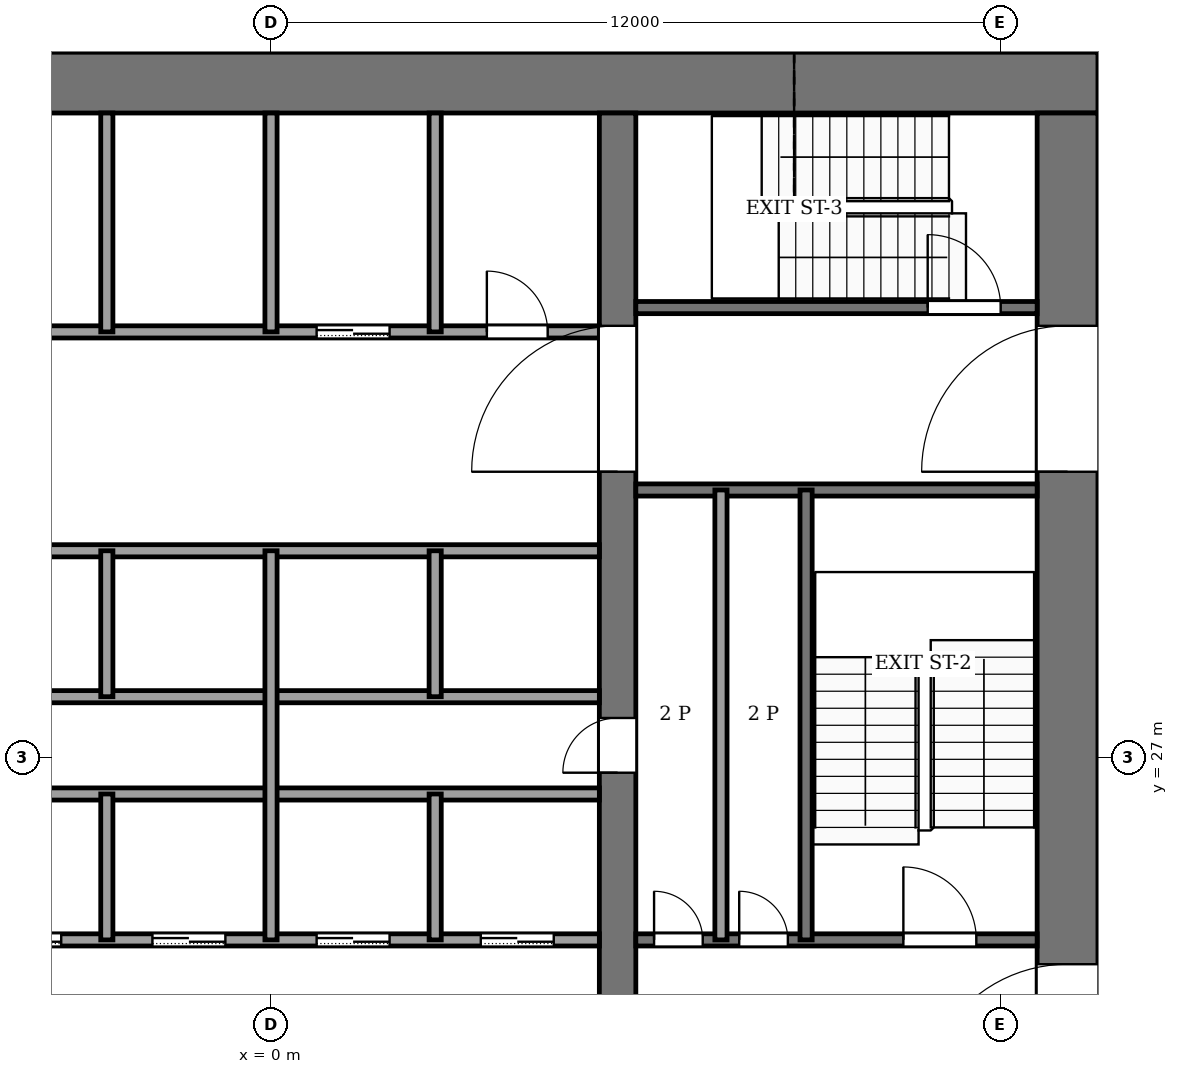
"""IFC4 building model, lengths in metres.
Left out: names, types, materials, properties, quantities, classifications, styles, units other than length and angle.
Written with IfcOpenShell. Run it as: python <this file> out.ifc"""

import sys

from ifc_helpers import new_model, si_unit, direction, frame, frame_2d, origin, place, context, subcontext, project, spatial, rectangle, extrude, element, fill, save


model = new_model("IFC4")
c1 = context("Model", 3, precision=1e-05, world=origin(), true_north=direction((0.0, 1.0)))
c2 = subcontext(c1, "Body", "Model", "MODEL_VIEW")
j1 = project(units=[si_unit("LENGTHUNIT", "METRE"), si_unit("PLANEANGLEUNIT", "RADIAN")], contexts=[c1])
p1 = place(None, origin())
s1 = spatial("IfcSite", under=j1, at=p1, CompositionType="ELEMENT")
p2 = place(p1, origin())
s2 = spatial("IfcBuilding", under=s1, at=p2, CompositionType="ELEMENT")
p3 = place(p2, frame((0.0, 0.0, 146.0)))
s3 = spatial("IfcBuildingStorey", under=s2, at=p3, CompositionType="ELEMENT", Elevation=146.0)
p4 = place(p3, frame((-13.6, 38.1, -0.13), z_axis=(0.0, 0.0, 1.0), x_axis=(1.0, 0.0, 0.0)))
e1 = element("IfcWall", 1, at=p4, inside=s3, PredefinedType="SHEAR", context=c2, shape_type="SweptSolid", body=[
    extrude(rectangle(XDim=27.2, YDim=1.0, at=frame_2d((13.6, 0.0))), origin(), (0.0, 0.0, 1.0), 4.0),
])
p5 = place(p3, frame((13.1, 18.4, -0.13), z_axis=(0.0, 0.0, 1.0), x_axis=(0.0, 1.0, 0.0)))
e2 = element("IfcWall", 2, at=p5, inside=s3, PredefinedType="SHEAR", context=c2, shape_type="SweptSolid", body=[
    extrude(rectangle(XDim=19.2, YDim=1.0, at=frame_2d((9.6, 0.0))), origin(), (0.0, 0.0, 1.0), 4.0),
])
p6 = place(p5, frame((2.8, 0.0, 0.13)))
e3 = element("IfcOpeningElement", 3, at=p6, cuts=e2, PredefinedType="OPENING", context=c2, shape_type="SweptSolid", body=[
    extrude(rectangle(XDim=2.4, YDim=2.4, at=frame_2d((1.2, 1.2))), frame((0.0, 0.51, 0.0), z_axis=(0.0, -1.0, 0.0), x_axis=(1.0, 0.0, 0.0)), (0.0, 0.0, 1.0), 1.02),
])
p7 = place(p5, frame((13.3, 0.0, 0.13)))
e4 = element("IfcOpeningElement", 4, at=p7, cuts=e2, PredefinedType="OPENING", context=c2, shape_type="SweptSolid", body=[
    extrude(rectangle(XDim=2.4, YDim=2.4, at=frame_2d((1.2, 1.2))), frame((0.0, 0.51, 0.0), z_axis=(0.0, -1.0, 0.0), x_axis=(1.0, 0.0, 0.0)), (0.0, 0.0, 1.0), 1.02),
])
p8 = place(p3, frame((5.7, 18.4, -0.13), z_axis=(0.0, 0.0, 1.0), x_axis=(0.0, 1.0, 0.0)))
e5 = element("IfcWall", 5, at=p8, inside=s3, PredefinedType="SHEAR", context=c2, shape_type="SweptSolid", body=[
    extrude(rectangle(XDim=19.2, YDim=0.6, at=frame_2d((9.6, 0.0))), origin(), (0.0, 0.0, 1.0), 4.0),
])
p9 = place(p8, frame((8.35, 0.0, 0.13)))
e6 = element("IfcOpeningElement", 6, at=p9, cuts=e5, PredefinedType="OPENING", context=c2, shape_type="SweptSolid", body=[
    extrude(rectangle(XDim=0.9, YDim=2.1, at=frame_2d((0.45, 1.05))), frame((0.0, 0.31, 0.0), z_axis=(0.0, -1.0, 0.0), x_axis=(1.0, 0.0, 0.0)), (0.0, 0.0, 1.0), 0.62),
])
p10 = place(p8, frame((13.3, 0.0, 0.13)))
e7 = element("IfcOpeningElement", 7, at=p10, cuts=e5, PredefinedType="OPENING", context=c2, shape_type="SweptSolid", body=[
    extrude(rectangle(XDim=2.4, YDim=2.4, at=frame_2d((1.2, 1.2))), frame((0.0, 0.31, 0.0), z_axis=(0.0, -1.0, 0.0), x_axis=(1.0, 0.0, 0.0)), (0.0, 0.0, 1.0), 0.62),
])
p11 = place(p3, frame((-5.4, 24.0, 0.0), z_axis=(0.0, 0.0, 1.0), x_axis=(1.0, 0.0, 0.0)))
e8 = element("IfcWall", 8, at=p11, inside=s3, PredefinedType="PARTITIONING", context=c2, shape_type="SweptSolid", body=[
    extrude(rectangle(XDim=10.8, YDim=0.2, at=frame_2d((5.4, 0.0))), origin(), (0.0, 0.0, 1.0), 3.87),
])
p12 = place(p11, frame((0.75, 0.0, 0.0)))
e9 = element("IfcOpeningElement", 9, at=p12, cuts=e8, PredefinedType="OPENING", context=c2, shape_type="SweptSolid", body=[
    extrude(rectangle(XDim=1.2, YDim=2.2, at=frame_2d((0.6, 1.1))), frame((0.0, 0.11, 0.0), z_axis=(0.0, -1.0, 0.0), x_axis=(1.0, 0.0, 0.0)), (0.0, 0.0, 1.0), 0.22),
])
p13 = place(p11, frame((3.45, 0.0, 0.0)))
e10 = element("IfcOpeningElement", 10, at=p13, cuts=e8, PredefinedType="OPENING", context=c2, shape_type="SweptSolid", body=[
    extrude(rectangle(XDim=1.2, YDim=2.2, at=frame_2d((0.6, 1.1))), frame((0.0, 0.11, 0.0), z_axis=(0.0, -1.0, 0.0), x_axis=(1.0, 0.0, 0.0)), (0.0, 0.0, 1.0), 0.22),
])
p14 = place(p11, frame((6.15, 0.0, 0.0)))
e11 = element("IfcOpeningElement", 11, at=p14, cuts=e8, PredefinedType="OPENING", context=c2, shape_type="SweptSolid", body=[
    extrude(rectangle(XDim=1.2, YDim=2.2, at=frame_2d((0.6, 1.1))), frame((0.0, 0.11, 0.0), z_axis=(0.0, -1.0, 0.0), x_axis=(1.0, 0.0, 0.0)), (0.0, 0.0, 1.0), 0.22),
])
p15 = place(p11, frame((8.85, 0.0, 0.0)))
e12 = element("IfcOpeningElement", 12, at=p15, cuts=e8, PredefinedType="OPENING", context=c2, shape_type="SweptSolid", body=[
    extrude(rectangle(XDim=1.2, YDim=2.2, at=frame_2d((0.6, 1.1))), frame((0.0, 0.11, 0.0), z_axis=(0.0, -1.0, 0.0), x_axis=(1.0, 0.0, 0.0)), (0.0, 0.0, 1.0), 0.22),
])
p16 = place(p3, frame((6.0, 24.0, 0.0), z_axis=(0.0, 0.0, 1.0), x_axis=(1.0, 0.0, 0.0)))
e13 = element("IfcWall", 13, at=p16, inside=s3, PredefinedType="PARTITIONING", context=c2, shape_type="SweptSolid", body=[
    extrude(rectangle(XDim=6.6, YDim=0.2, at=frame_2d((3.3, 0.0))), origin(), (0.0, 0.0, 1.0), 3.87),
])
p17 = place(p16, frame((0.3, 0.0, 0.0)))
e14 = element("IfcOpeningElement", 14, at=p17, cuts=e13, PredefinedType="OPENING", context=c2, shape_type="SweptSolid", body=[
    extrude(rectangle(XDim=0.8, YDim=2.1, at=frame_2d((0.4, 1.05))), frame((0.0, 0.11, 0.0), z_axis=(0.0, -1.0, 0.0), x_axis=(1.0, 0.0, 0.0)), (0.0, 0.0, 1.0), 0.22),
])
p18 = place(p16, frame((1.7, 0.0, 0.0)))
e15 = element("IfcOpeningElement", 15, at=p18, cuts=e13, PredefinedType="OPENING", context=c2, shape_type="SweptSolid", body=[
    extrude(rectangle(XDim=0.8, YDim=2.1, at=frame_2d((0.4, 1.05))), frame((0.0, 0.11, 0.0), z_axis=(0.0, -1.0, 0.0), x_axis=(1.0, 0.0, 0.0)), (0.0, 0.0, 1.0), 0.22),
])
p19 = place(p16, frame((4.4, 0.0, 0.0)))
e16 = element("IfcOpeningElement", 16, at=p19, cuts=e13, PredefinedType="OPENING", context=c2, shape_type="SweptSolid", body=[
    extrude(rectangle(XDim=1.2, YDim=2.2, at=frame_2d((0.6, 1.1))), frame((0.0, 0.11, 0.0), z_axis=(0.0, -1.0, 0.0), x_axis=(1.0, 0.0, 0.0)), (0.0, 0.0, 1.0), 0.22),
])
for number, where, z_axis, x_axis in (
    (17, (-5.4, 26.4, 0.0), (0.0, 0.0, 1.0), (1.0, 0.0, 0.0)),
    (18, (-5.4, 28.0, 0.0), (0.0, 0.0, 1.0), (1.0, 0.0, 0.0)),
    (19, (-5.4, 30.4, 0.0), (0.0, 0.0, 1.0), (1.0, 0.0, 0.0)),
):
    element("IfcWall", number, at=place(p3, frame(where, z_axis=z_axis, x_axis=x_axis)), inside=s3, PredefinedType="PARTITIONING", context=c2, shape_type="SweptSolid", body=[
        extrude(rectangle(XDim=10.8, YDim=0.2, at=frame_2d((5.4, 0.0))), origin(), (0.0, 0.0, 1.0), 3.87),
    ])
p20 = place(p3, frame((6.0, 31.4, 0.0), z_axis=(0.0, 0.0, 1.0), x_axis=(1.0, 0.0, 0.0)))
e20 = element("IfcWall", 20, at=p20, inside=s3, PredefinedType="PARTITIONING", context=c2, shape_type="SweptSolid", body=[
    extrude(rectangle(XDim=6.6, YDim=0.2, at=frame_2d((3.3, 0.0))), origin(), (0.0, 0.0, 1.0), 3.87),
])
p21 = place(p3, frame((-5.4, 34.0, 0.0), z_axis=(0.0, 0.0, 1.0), x_axis=(1.0, 0.0, 0.0)))
e21 = element("IfcWall", 21, at=p21, inside=s3, PredefinedType="PARTITIONING", context=c2, shape_type="SweptSolid", body=[
    extrude(rectangle(XDim=10.8, YDim=0.2, at=frame_2d((5.4, 0.0))), origin(), (0.0, 0.0, 1.0), 3.87),
])
p22 = place(p21, frame((6.15, 0.0, 0.0)))
e22 = element("IfcOpeningElement", 22, at=p22, cuts=e21, PredefinedType="OPENING", context=c2, shape_type="SweptSolid", body=[
    extrude(rectangle(XDim=1.2, YDim=2.2, at=frame_2d((0.6, 1.1))), frame((0.0, 0.11, 0.0), z_axis=(0.0, -1.0, 0.0), x_axis=(1.0, 0.0, 0.0)), (0.0, 0.0, 1.0), 0.22),
])
p23 = place(p21, frame((8.95, 0.0, 0.0)))
e23 = element("IfcOpeningElement", 23, at=p23, cuts=e21, PredefinedType="OPENING", context=c2, shape_type="SweptSolid", body=[
    extrude(rectangle(XDim=1.0, YDim=2.1, at=frame_2d((0.5, 1.05))), frame((0.0, 0.11, 0.0), z_axis=(0.0, -1.0, 0.0), x_axis=(1.0, 0.0, 0.0)), (0.0, 0.0, 1.0), 0.22),
])
p24 = place(p3, frame((6.0, 34.4, 0.0), z_axis=(0.0, 0.0, 1.0), x_axis=(1.0, 0.0, 0.0)))
e24 = element("IfcWall", 24, at=p24, inside=s3, PredefinedType="PARTITIONING", context=c2, shape_type="SweptSolid", body=[
    extrude(rectangle(XDim=6.6, YDim=0.2, at=frame_2d((3.3, 0.0))), origin(), (0.0, 0.0, 1.0), 3.87),
])
p25 = place(p24, frame((4.8, 0.0, 0.0)))
e25 = element("IfcOpeningElement", 25, at=p25, cuts=e24, PredefinedType="OPENING", context=c2, shape_type="SweptSolid", body=[
    extrude(rectangle(XDim=1.2, YDim=2.2, at=frame_2d((0.6, 1.1))), frame((0.0, 0.11, 0.0), z_axis=(0.0, -1.0, 0.0), x_axis=(1.0, 0.0, 0.0)), (0.0, 0.0, 1.0), 0.22),
])
for number, where, z_axis, x_axis in (
    (26, (-2.7, 24.0, 0.0), (0.0, 0.0, 1.0), (0.0, 1.0, 0.0)),
    (27, (-2.7, 28.0, 0.0), (0.0, 0.0, 1.0), (0.0, 1.0, 0.0)),
):
    element("IfcWall", number, at=place(p3, frame(where, z_axis=z_axis, x_axis=x_axis)), inside=s3, PredefinedType="PARTITIONING", context=c2, shape_type="SweptSolid", body=[
        extrude(rectangle(XDim=2.4, YDim=0.2, at=frame_2d((1.2, 0.0))), origin(), (0.0, 0.0, 1.0), 3.87),
    ])
p26 = place(p3, frame((-2.7, 34.0, 0.0), z_axis=(0.0, 0.0, 1.0), x_axis=(0.0, 1.0, 0.0)))
e28 = element("IfcWall", 28, at=p26, inside=s3, PredefinedType="PARTITIONING", context=c2, shape_type="SweptSolid", body=[
    extrude(rectangle(XDim=3.6, YDim=0.2, at=frame_2d((1.8, 0.0))), origin(), (0.0, 0.0, 1.0), 3.87),
])
p27 = place(p3, frame((0.0, 24.0, 0.0), z_axis=(0.0, 0.0, 1.0), x_axis=(0.0, 1.0, 0.0)))
e29 = element("IfcWall", 29, at=p27, inside=s3, PredefinedType="PARTITIONING", context=c2, shape_type="SweptSolid", body=[
    extrude(rectangle(XDim=6.4, YDim=0.2, at=frame_2d((3.2, 0.0))), origin(), (0.0, 0.0, 1.0), 3.87),
])
p28 = place(p3, frame((0.0, 34.0, 0.0), z_axis=(0.0, 0.0, 1.0), x_axis=(0.0, 1.0, 0.0)))
e30 = element("IfcWall", 30, at=p28, inside=s3, PredefinedType="PARTITIONING", context=c2, shape_type="SweptSolid", body=[
    extrude(rectangle(XDim=3.6, YDim=0.2, at=frame_2d((1.8, 0.0))), origin(), (0.0, 0.0, 1.0), 3.87),
])
for number, where, z_axis, x_axis in (
    (31, (2.7, 24.0, 0.0), (0.0, 0.0, 1.0), (0.0, 1.0, 0.0)),
    (32, (2.7, 28.0, 0.0), (0.0, 0.0, 1.0), (0.0, 1.0, 0.0)),
):
    element("IfcWall", number, at=place(p3, frame(where, z_axis=z_axis, x_axis=x_axis)), inside=s3, PredefinedType="PARTITIONING", context=c2, shape_type="SweptSolid", body=[
        extrude(rectangle(XDim=2.4, YDim=0.2, at=frame_2d((1.2, 0.0))), origin(), (0.0, 0.0, 1.0), 3.87),
    ])
p29 = place(p3, frame((2.7, 34.0, 0.0), z_axis=(0.0, 0.0, 1.0), x_axis=(0.0, 1.0, 0.0)))
e33 = element("IfcWall", 33, at=p29, inside=s3, PredefinedType="PARTITIONING", context=c2, shape_type="SweptSolid", body=[
    extrude(rectangle(XDim=3.6, YDim=0.2, at=frame_2d((1.8, 0.0))), origin(), (0.0, 0.0, 1.0), 3.87),
])
for number, where, z_axis, x_axis in (
    (34, (7.4, 24.0, 0.0), (0.0, 0.0, 1.0), (0.0, 1.0, 0.0)),
    (35, (8.8, 24.0, 0.0), (0.0, 0.0, 1.0), (0.0, 1.0, 0.0)),
):
    element("IfcWall", number, at=place(p3, frame(where, z_axis=z_axis, x_axis=x_axis)), inside=s3, PredefinedType="PARTITIONING", context=c2, shape_type="SweptSolid", body=[
        extrude(rectangle(XDim=7.4, YDim=0.2, at=frame_2d((3.7, 0.0))), origin(), (0.0, 0.0, 1.0), 3.87),
    ])
p30 = place(p12, origin())
e36 = element("IfcDoor", 36, at=p30, inside=s3, OperationType="SLIDING_TO_LEFT", PredefinedType="DOOR", context=c2, shape_type="SweptSolid", body=[
    extrude(rectangle(XDim=1.2, YDim=2.2, at=frame_2d((0.6, 1.1))), frame((0.0, 0.025, 0.0), z_axis=(0.0, -1.0, 0.0), x_axis=(1.0, 0.0, 0.0)), (0.0, 0.0, 1.0), 0.05),
])
fill(e9, e36)
p31 = place(p13, origin())
e37 = element("IfcDoor", 37, at=p31, inside=s3, OperationType="SLIDING_TO_LEFT", PredefinedType="DOOR", context=c2, shape_type="SweptSolid", body=[
    extrude(rectangle(XDim=1.2, YDim=2.2, at=frame_2d((0.6, 1.1))), frame((0.0, 0.025, 0.0), z_axis=(0.0, -1.0, 0.0), x_axis=(1.0, 0.0, 0.0)), (0.0, 0.0, 1.0), 0.05),
])
fill(e10, e37)
p32 = place(p14, origin())
e38 = element("IfcDoor", 38, at=p32, inside=s3, OperationType="SLIDING_TO_LEFT", PredefinedType="DOOR", context=c2, shape_type="SweptSolid", body=[
    extrude(rectangle(XDim=1.2, YDim=2.2, at=frame_2d((0.6, 1.1))), frame((0.0, 0.025, 0.0), z_axis=(0.0, -1.0, 0.0), x_axis=(1.0, 0.0, 0.0)), (0.0, 0.0, 1.0), 0.05),
])
fill(e11, e38)
p33 = place(p15, origin())
e39 = element("IfcDoor", 39, at=p33, inside=s3, OperationType="SLIDING_TO_LEFT", PredefinedType="DOOR", context=c2, shape_type="SweptSolid", body=[
    extrude(rectangle(XDim=1.2, YDim=2.2, at=frame_2d((0.6, 1.1))), frame((0.0, 0.025, 0.0), z_axis=(0.0, -1.0, 0.0), x_axis=(1.0, 0.0, 0.0)), (0.0, 0.0, 1.0), 0.05),
])
fill(e12, e39)
p34 = place(p22, origin())
e40 = element("IfcDoor", 40, at=p34, inside=s3, OperationType="SLIDING_TO_LEFT", PredefinedType="DOOR", context=c2, shape_type="SweptSolid", body=[
    extrude(rectangle(XDim=1.2, YDim=2.2, at=frame_2d((0.6, 1.1))), frame((0.0, 0.025, 0.0), z_axis=(0.0, -1.0, 0.0), x_axis=(1.0, 0.0, 0.0)), (0.0, 0.0, 1.0), 0.05),
])
fill(e22, e40)
p35 = place(p17, origin())
e41 = element("IfcDoor", 41, at=p35, inside=s3, OperationType="SINGLE_SWING_RIGHT", PredefinedType="DOOR", context=c2, shape_type="SweptSolid", body=[
    extrude(rectangle(XDim=0.8, YDim=2.1, at=frame_2d((0.4, 1.05))), frame((0.0, 0.025, 0.0), z_axis=(0.0, -1.0, 0.0), x_axis=(1.0, 0.0, 0.0)), (0.0, 0.0, 1.0), 0.05),
])
fill(e14, e41)
p36 = place(p18, origin())
e42 = element("IfcDoor", 42, at=p36, inside=s3, OperationType="SINGLE_SWING_LEFT", PredefinedType="DOOR", context=c2, shape_type="SweptSolid", body=[
    extrude(rectangle(XDim=0.8, YDim=2.1, at=frame_2d((0.4, 1.05))), frame((0.0, 0.025, 0.0), z_axis=(0.0, -1.0, 0.0), x_axis=(1.0, 0.0, 0.0)), (0.0, 0.0, 1.0), 0.05),
])
fill(e15, e42)
p37 = place(p23, origin())
e43 = element("IfcDoor", 43, at=p37, inside=s3, OperationType="SINGLE_SWING_LEFT", PredefinedType="DOOR", context=c2, shape_type="SweptSolid", body=[
    extrude(rectangle(XDim=1.0, YDim=2.1, at=frame_2d((0.5, 1.05))), frame((0.0, 0.025, 0.0), z_axis=(0.0, -1.0, 0.0), x_axis=(1.0, 0.0, 0.0)), (0.0, 0.0, 1.0), 0.05),
])
fill(e23, e43)
p38 = place(p9, origin())
e44 = element("IfcDoor", 44, at=p38, inside=s3, OperationType="SINGLE_SWING_RIGHT", PredefinedType="DOOR", context=c2, shape_type="SweptSolid", body=[
    extrude(rectangle(XDim=0.9, YDim=2.1, at=frame_2d((0.45, 1.05))), frame((0.0, 0.025, 0.0), z_axis=(0.0, -1.0, 0.0), x_axis=(1.0, 0.0, 0.0)), (0.0, 0.0, 1.0), 0.05),
])
fill(e6, e44)
p39 = place(p19, origin())
e45 = element("IfcDoor", 45, at=p39, inside=s3, OperationType="SINGLE_SWING_LEFT", PredefinedType="DOOR", context=c2, shape_type="SweptSolid", body=[
    extrude(rectangle(XDim=1.2, YDim=2.2, at=frame_2d((0.6, 1.1))), frame((0.0, 0.025, 0.0), z_axis=(0.0, -1.0, 0.0), x_axis=(1.0, 0.0, 0.0)), (0.0, 0.0, 1.0), 0.05),
])
fill(e16, e45)
p40 = place(p25, origin())
e46 = element("IfcDoor", 46, at=p40, inside=s3, OperationType="SINGLE_SWING_RIGHT", PredefinedType="DOOR", context=c2, shape_type="SweptSolid", body=[
    extrude(rectangle(XDim=1.2, YDim=2.2, at=frame_2d((0.6, 1.1))), frame((0.0, 0.025, 0.0), z_axis=(0.0, -1.0, 0.0), x_axis=(1.0, 0.0, 0.0)), (0.0, 0.0, 1.0), 0.05),
])
fill(e25, e46)
p41 = place(p10, origin())
e47 = element("IfcDoor", 47, at=p41, inside=s3, OperationType="DOUBLE_DOOR_SINGLE_SWING", PredefinedType="DOOR", context=c2, shape_type="SweptSolid", body=[
    extrude(rectangle(XDim=2.4, YDim=2.4, at=frame_2d((1.2, 1.2))), frame((0.0, 0.025, 0.0), z_axis=(0.0, -1.0, 0.0), x_axis=(1.0, 0.0, 0.0)), (0.0, 0.0, 1.0), 0.05),
])
fill(e7, e47)
p42 = place(p6, origin())
e48 = element("IfcDoor", 48, at=p42, inside=s3, OperationType="DOUBLE_DOOR_SINGLE_SWING", PredefinedType="DOOR", context=c2, shape_type="SweptSolid", body=[
    extrude(rectangle(XDim=2.4, YDim=2.4, at=frame_2d((1.2, 1.2))), frame((0.0, 0.025, 0.0), z_axis=(0.0, -1.0, 0.0), x_axis=(1.0, 0.0, 0.0)), (0.0, 0.0, 1.0), 0.05),
])
fill(e3, e48)
p43 = place(p7, origin())
e49 = element("IfcDoor", 49, at=p43, inside=s3, OperationType="DOUBLE_DOOR_SINGLE_SWING", PredefinedType="DOOR", context=c2, shape_type="SweptSolid", body=[
    extrude(rectangle(XDim=2.4, YDim=2.4, at=frame_2d((1.2, 1.2))), frame((0.0, 0.025, 0.0), z_axis=(0.0, -1.0, 0.0), x_axis=(1.0, 0.0, 0.0)), (0.0, 0.0, 1.0), 0.05),
])
fill(e4, e49)
save(model, sys.argv[1])
